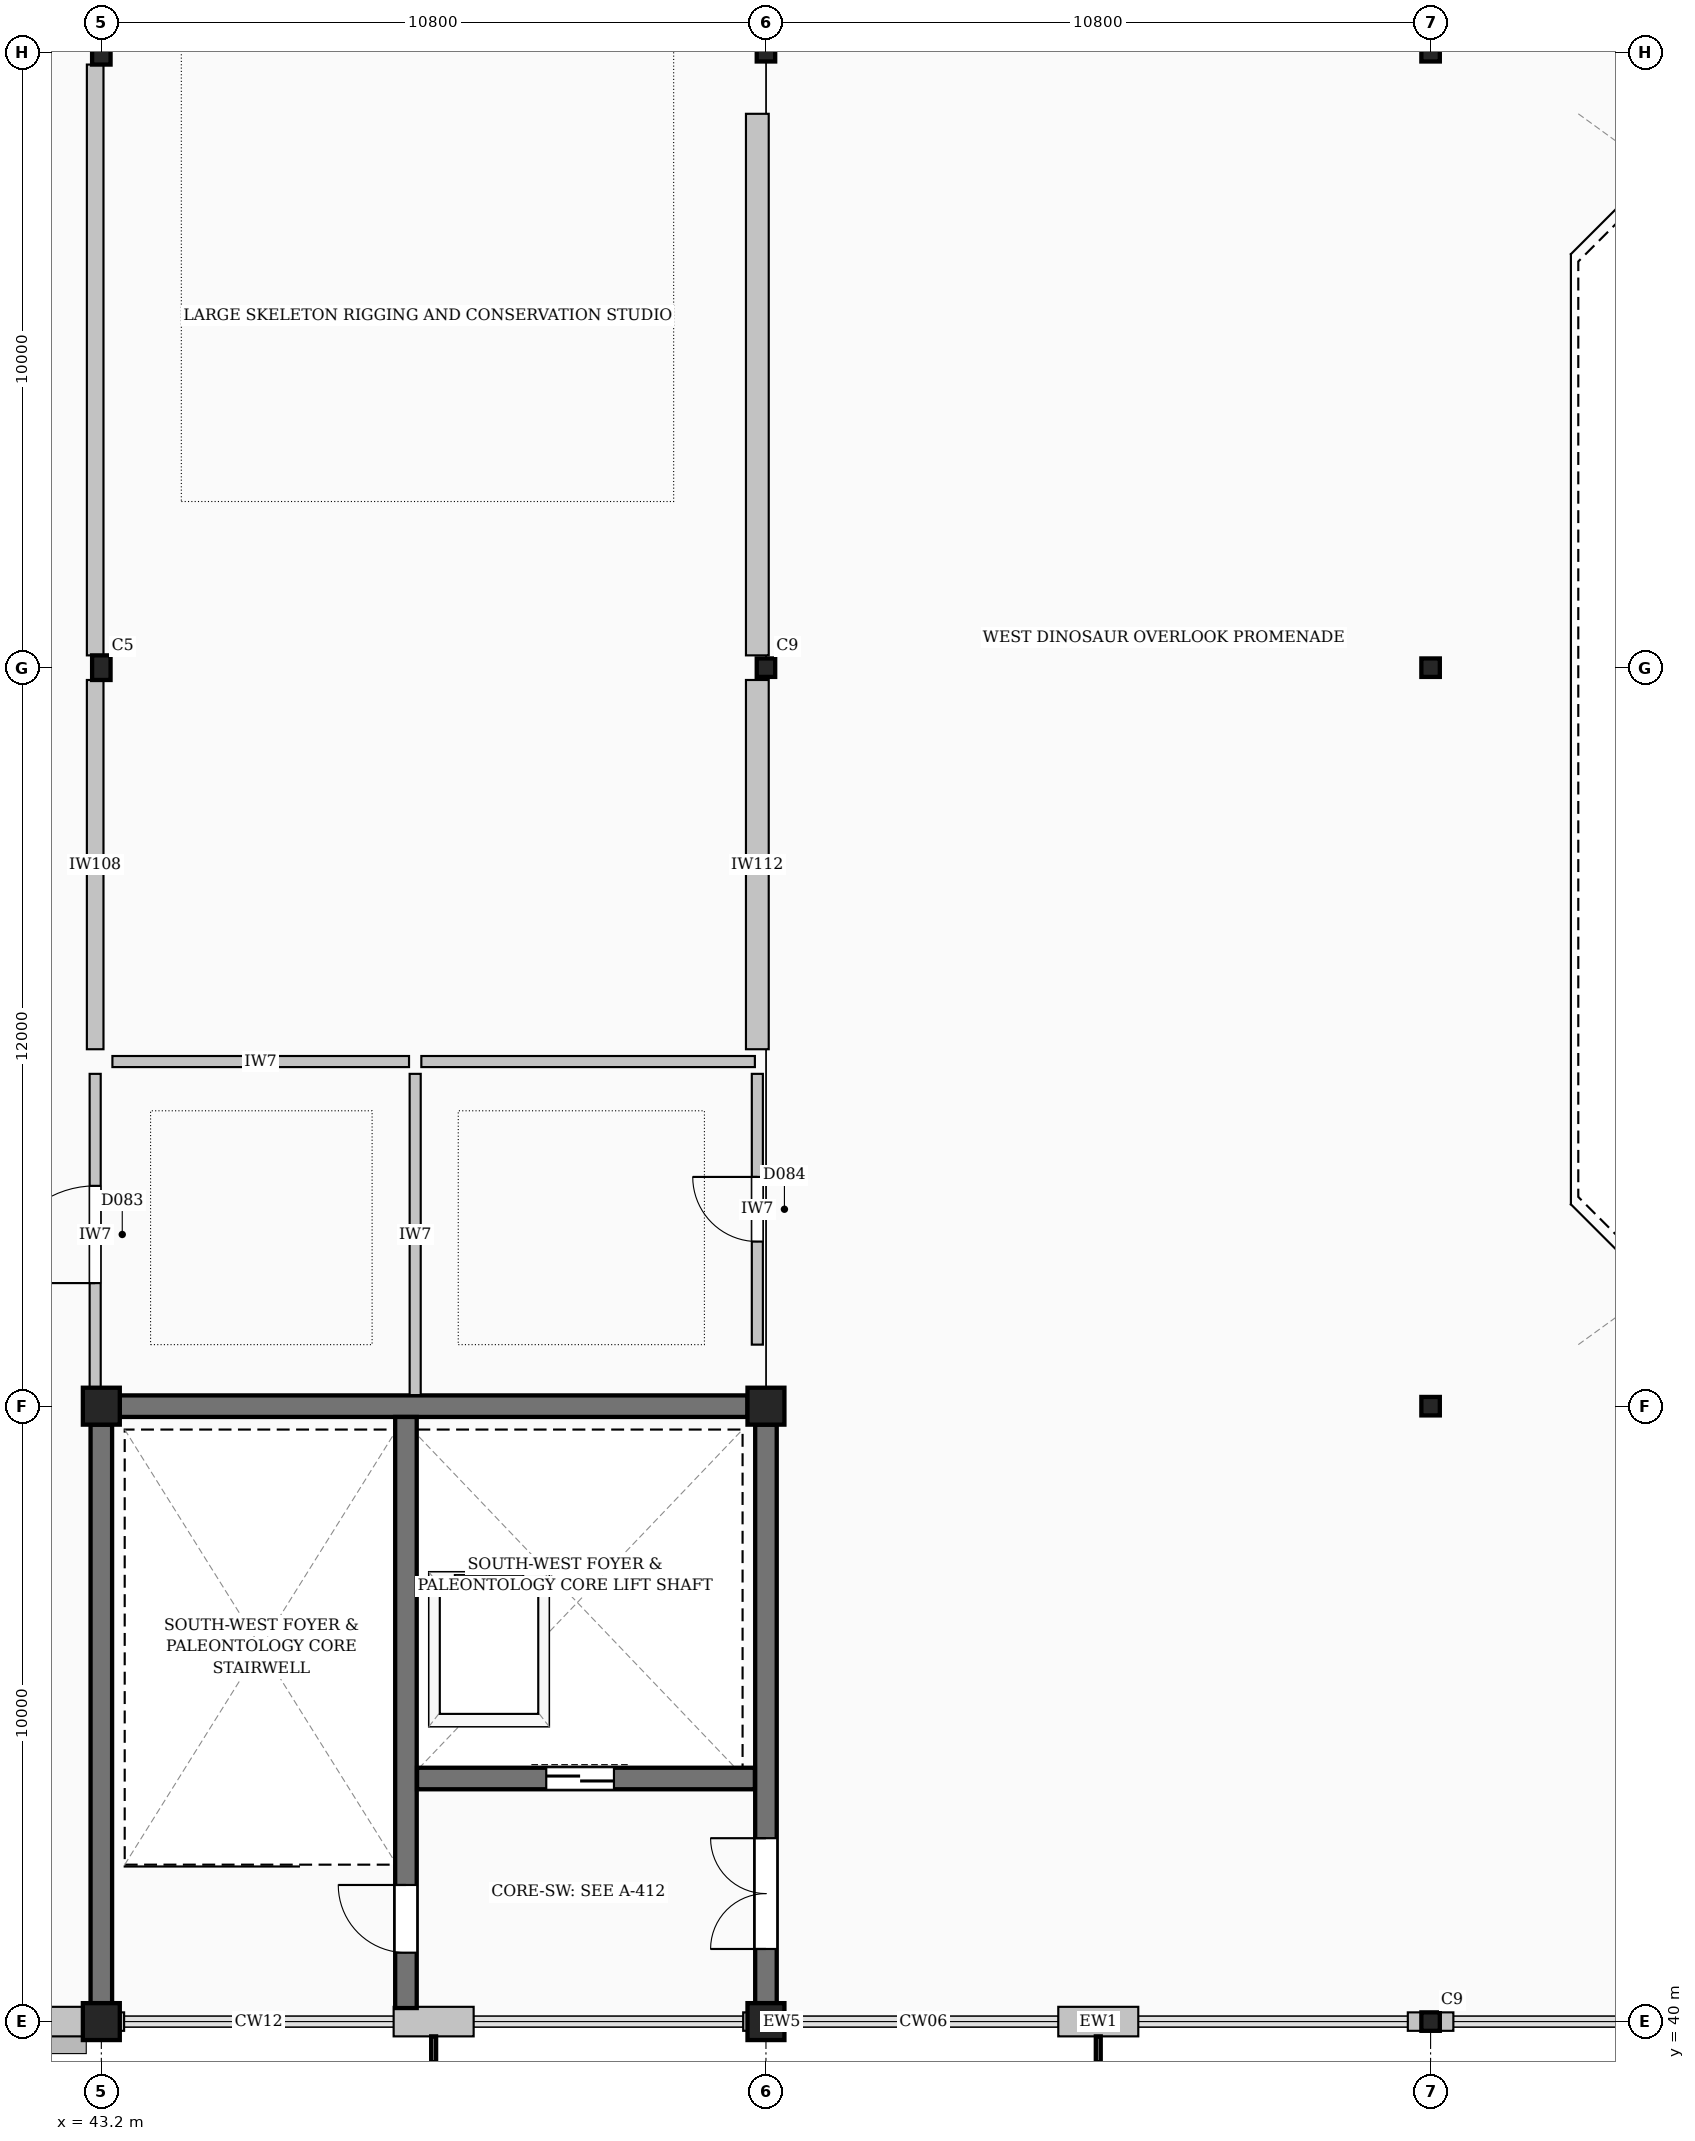
"""IFC4 building model, lengths in metres.
Left out: names, types, materials, properties, quantities, classifications, styles, units other than length and angle.
Written with IfcOpenShell. Run it as: python <this file> out.ifc"""

import sys

from ifc_helpers import new_model, si_unit, direction, frame, frame_2d, origin, origin_2d, place, context, subcontext, project, spatial, rectangle, hollow_rectangle, i_section, extrude, element, fill, save


model = new_model("IFC4")
c1 = context("Model", 3, precision=1e-05, world=origin(), true_north=direction((0.0, 1.0)))
c2 = subcontext(c1, "Body", "Model", "MODEL_VIEW")
j1 = project(units=[si_unit("LENGTHUNIT", "METRE"), si_unit("PLANEANGLEUNIT", "RADIAN")], contexts=[c1])
p1 = place(None, origin())
s1 = spatial("IfcSite", under=j1, at=p1, CompositionType="ELEMENT")
p2 = place(p1, origin())
s2 = spatial("IfcBuilding", under=s1, at=p2, CompositionType="ELEMENT")
p3 = place(p2, frame((0.0, 0.0, 14.4)))
s3 = spatial("IfcBuildingStorey", under=s2, at=p3, CompositionType="ELEMENT", Elevation=14.4)
for number, where, z_axis, x_axis in (
    (1, (43.2, 40.0, 0.0), (0.0, 0.0, 1.0), (1.0, 0.0, 0.0)),
    (2, (43.2, 50.0, 0.0), (0.0, 0.0, 1.0), (1.0, 0.0, 0.0)),
):
    element("IfcColumn", number, at=place(p3, frame(where, z_axis=z_axis, x_axis=x_axis)), inside=s3, PredefinedType="COLUMN", context=c2, shape_type="SweptSolid", body=[
        extrude(rectangle(XDim=0.6, YDim=0.6, at=origin_2d()), origin(), (0.0, 0.0, 1.0), 9.6),
    ])
for number, where, z_axis, x_axis in (
    (3, (43.2, 62.0, 0.0), (0.0, 0.0, 1.0), (1.0, 0.0, 0.0)),
    (4, (43.2, 72.0, 0.0), (0.0, 0.0, 1.0), (1.0, 0.0, 0.0)),
):
    element("IfcColumn", number, at=place(p3, frame(where, z_axis=z_axis, x_axis=x_axis)), inside=s3, PredefinedType="COLUMN", context=c2, shape_type="SweptSolid", body=[
        extrude(i_section(OverallWidth=0.3, OverallDepth=0.4, WebThickness=0.013, FlangeThickness=0.024, FilletRadius=0.027, at=origin_2d()), origin(), (0.0, 0.0, 1.0), 9.6),
    ])
for number, where, z_axis, x_axis in (
    (5, (54.0, 40.0, 0.0), (0.0, 0.0, 1.0), (1.0, 0.0, 0.0)),
    (6, (54.0, 50.0, 0.0), (0.0, 0.0, 1.0), (1.0, 0.0, 0.0)),
):
    element("IfcColumn", number, at=place(p3, frame(where, z_axis=z_axis, x_axis=x_axis)), inside=s3, PredefinedType="COLUMN", context=c2, shape_type="SweptSolid", body=[
        extrude(rectangle(XDim=0.6, YDim=0.6, at=origin_2d()), origin(), (0.0, 0.0, 1.0), 9.6),
    ])
for number, where, z_axis, x_axis in (
    (7, (54.0, 62.0, 0.0), (0.0, 0.0, 1.0), (1.0, 0.0, 0.0)),
    (8, (54.0, 72.0, 0.0), (0.0, 0.0, 1.0), (1.0, 0.0, 0.0)),
    (9, (64.8, 40.0, 0.0), (0.0, 0.0, 1.0), (1.0, 0.0, 0.0)),
    (10, (64.8, 50.0, 0.0), (0.0, 0.0, 1.0), (1.0, 0.0, 0.0)),
    (11, (64.8, 62.0, 0.0), (0.0, 0.0, 1.0), (1.0, 0.0, 0.0)),
    (12, (64.8, 72.0, 0.0), (0.0, 0.0, 1.0), (1.0, 0.0, 0.0)),
):
    element("IfcColumn", number, at=place(p3, frame(where, z_axis=z_axis, x_axis=x_axis)), inside=s3, PredefinedType="COLUMN", context=c2, shape_type="SweptSolid", body=[
        extrude(hollow_rectangle(XDim=0.3, YDim=0.3, WallThickness=0.016, InnerFilletRadius=0.016, OuterFilletRadius=0.032, at=origin_2d()), origin(), (0.0, 0.0, 1.0), 9.6),
    ])
p4 = place(p3, frame((32.545, 40.0, 0.0), z_axis=(0.0, 0.0, 1.0), x_axis=(1.0, 0.0, 0.0)))
e13 = element("IfcWall", 13, at=p4, inside=s3, PredefinedType="STANDARD", context=c2, shape_type="SweptSolid", body=[
    extrude(rectangle(XDim=10.51, YDim=0.48, at=frame_2d((5.255, 0.0))), origin(), (0.0, 0.0, 1.0), 9.36),
])
p5 = place(p4, frame((3.555, 0.0, 1.1)))
e14 = element("IfcOpeningElement", 14, at=p5, cuts=e13, PredefinedType="OPENING", context=c2, shape_type="SweptSolid", body=[
    extrude(rectangle(XDim=3.4, YDim=5.8, at=frame_2d((1.7, 2.9))), frame((0.0, 0.25, 0.0), z_axis=(0.0, -1.0, 0.0), x_axis=(1.0, 0.0, 0.0)), (0.0, 0.0, 1.0), 0.5),
])
p6 = place(p3, frame((47.95, 40.0, 0.0), z_axis=(0.0, 0.0, 1.0), x_axis=(1.0, 0.0, 0.0)))
e15 = element("IfcWall", 15, at=p6, inside=s3, PredefinedType="STANDARD", context=c2, shape_type="SweptSolid", body=[
    extrude(rectangle(XDim=1.3, YDim=0.48, at=frame_2d((0.65, 0.0))), origin(), (0.0, 0.0, 1.0), 9.36),
])
for number, where, z_axis, x_axis in (
    (16, (43.345, 40.0, 0.0), (0.0, 0.0, 1.0), (1.0, 0.0, 0.0)),
    (17, (53.63, 40.0, 0.0), (0.0, 0.0, 1.0), (1.0, 0.0, 0.0)),
):
    element("IfcWall", number, at=place(p3, frame(where, z_axis=z_axis, x_axis=x_axis)), inside=s3, PredefinedType="STANDARD", context=c2, shape_type="SweptSolid", body=[
        extrude(rectangle(XDim=0.225, YDim=0.3, at=frame_2d((0.113, 0.0))), origin(), (0.0, 0.0, 1.0), 9.36),
    ])
p7 = place(p3, frame((58.75, 40.0, 0.0), z_axis=(0.0, 0.0, 1.0), x_axis=(1.0, 0.0, 0.0)))
e18 = element("IfcWall", 18, at=p7, inside=s3, PredefinedType="STANDARD", context=c2, shape_type="SweptSolid", body=[
    extrude(rectangle(XDim=1.3, YDim=0.48, at=frame_2d((0.65, 0.0))), origin(), (0.0, 0.0, 1.0), 8.96),
])
for number, where, z_axis, x_axis in (
    (19, (54.145, 40.0, 0.0), (0.0, 0.0, 1.0), (1.0, 0.0, 0.0)),
    (20, (64.43, 40.0, 0.0), (0.0, 0.0, 1.0), (1.0, 0.0, 0.0)),
):
    element("IfcWall", number, at=place(p3, frame(where, z_axis=z_axis, x_axis=x_axis)), inside=s3, PredefinedType="STANDARD", context=c2, shape_type="SweptSolid", body=[
        extrude(rectangle(XDim=0.225, YDim=0.3, at=frame_2d((0.113, 0.0))), origin(), (0.0, 0.0, 1.0), 9.36),
    ])
p8 = place(p3, frame((64.945, 40.0, 0.0), z_axis=(0.0, 0.0, 1.0), x_axis=(1.0, 0.0, 0.0)))
e21 = element("IfcWall", 21, at=p8, inside=s3, PredefinedType="STANDARD", context=c2, shape_type="SweptSolid", body=[
    extrude(rectangle(XDim=0.225, YDim=0.3, at=frame_2d((0.112, 0.0))), origin(), (0.0, 0.0, 1.0), 9.36),
])
p9 = place(p3, frame((43.5, 50.0, 0.0), z_axis=(0.0, 0.0, 1.0), x_axis=(1.0, 0.0, 0.0)))
e22 = element("IfcWall", 22, at=p9, inside=s3, PredefinedType="SHEAR", context=c2, shape_type="SweptSolid", body=[
    extrude(rectangle(XDim=10.2, YDim=0.35, at=frame_2d((5.1, 0.0))), origin(), (0.0, 0.0, 1.0), 9.36),
])
p10 = place(p3, frame((43.2, 40.3, 0.0), z_axis=(0.0, 0.0, 1.0), x_axis=(0.0, 1.0, 0.0)))
e23 = element("IfcWall", 23, at=p10, inside=s3, PredefinedType="SHEAR", context=c2, shape_type="SweptSolid", body=[
    extrude(rectangle(XDim=9.4, YDim=0.35, at=frame_2d((4.7, 0.0))), origin(), (0.0, 0.0, 1.0), 9.36),
])
p11 = place(p3, frame((54.0, 40.3, 0.0), z_axis=(0.0, 0.0, 1.0), x_axis=(0.0, 1.0, 0.0)))
e24 = element("IfcWall", 24, at=p11, inside=s3, PredefinedType="SHEAR", context=c2, shape_type="SweptSolid", body=[
    extrude(rectangle(XDim=9.4, YDim=0.35, at=frame_2d((4.7, 0.0))), origin(), (0.0, 0.0, 1.0), 9.36),
])
p12 = place(p11, frame((0.88, 0.0, 0.0)))
e25 = element("IfcOpeningElement", 25, at=p12, cuts=e24, PredefinedType="OPENING", context=c2, shape_type="SweptSolid", body=[
    extrude(rectangle(XDim=1.8, YDim=2.25, at=frame_2d((0.9, 1.125))), frame((0.0, 0.185, 0.0), z_axis=(0.0, -1.0, 0.0), x_axis=(1.0, 0.0, 0.0)), (0.0, 0.0, 1.0), 0.37),
])
p13 = place(p3, frame((48.15, 40.22, 0.0), z_axis=(0.0, 0.0, 1.0), x_axis=(0.0, 1.0, 0.0)))
e26 = element("IfcWall", 26, at=p13, inside=s3, PredefinedType="SHEAR", context=c2, shape_type="SweptSolid", body=[
    extrude(rectangle(XDim=9.605, YDim=0.35, at=frame_2d((4.802, 0.0))), origin(), (0.0, 0.0, 1.0), 9.36),
])
p14 = place(p13, frame((0.9, 0.0, 0.0)))
e27 = element("IfcOpeningElement", 27, at=p14, cuts=e26, PredefinedType="OPENING", context=c2, shape_type="SweptSolid", body=[
    extrude(rectangle(XDim=1.1, YDim=2.2, at=frame_2d((0.55, 1.1))), frame((0.0, 0.185, 0.0), z_axis=(0.0, -1.0, 0.0), x_axis=(1.0, 0.0, 0.0)), (0.0, 0.0, 1.0), 0.37),
])
p15 = place(p3, frame((48.33, 43.95, 0.0), z_axis=(0.0, 0.0, 1.0), x_axis=(1.0, 0.0, 0.0)))
e28 = element("IfcWall", 28, at=p15, inside=s3, PredefinedType="SHEAR", context=c2, shape_type="SweptSolid", body=[
    extrude(rectangle(XDim=5.49, YDim=0.35, at=frame_2d((2.745, 0.0))), origin(), (0.0, 0.0, 1.0), 9.36),
])
p16 = place(p15, frame((2.1, 0.0, 0.0)))
e29 = element("IfcOpeningElement", 29, at=p16, cuts=e28, PredefinedType="OPENING", context=c2, shape_type="SweptSolid", body=[
    extrude(rectangle(XDim=1.1, YDim=2.2, at=frame_2d((0.55, 1.1))), frame((0.0, 0.185, 0.0), z_axis=(0.0, -1.0, 0.0), x_axis=(1.0, 0.0, 0.0)), (0.0, 0.0, 1.0), 0.37),
])
p17 = place(p3, frame((43.1, 50.18, 0.0), z_axis=(0.0, 0.0, 1.0), x_axis=(0.0, 1.0, 0.0)))
e30 = element("IfcWall", 30, at=p17, inside=s3, PredefinedType="PLUMBINGWALL", context=c2, shape_type="SweptSolid", body=[
    extrude(rectangle(XDim=5.22, YDim=0.18, at=frame_2d((2.61, 0.0))), origin(), (0.0, 0.0, 1.0), 9.32),
])
p18 = place(p17, frame((1.82, 0.0, 0.0)))
e31 = element("IfcOpeningElement", 31, at=p18, cuts=e30, PredefinedType="OPENING", context=c2, shape_type="SweptSolid", body=[
    extrude(rectangle(XDim=1.58, YDim=2.48, at=frame_2d((0.79, 1.24))), frame((0.0, 0.1, 0.0), z_axis=(0.0, -1.0, 0.0), x_axis=(1.0, 0.0, 0.0)), (0.0, 0.0, 1.0), 0.2),
])
p19 = place(p3, frame((53.86, 51.0, 0.0), z_axis=(0.0, 0.0, 1.0), x_axis=(0.0, 1.0, 0.0)))
e32 = element("IfcWall", 32, at=p19, inside=s3, PredefinedType="PLUMBINGWALL", context=c2, shape_type="SweptSolid", body=[
    extrude(rectangle(XDim=4.4, YDim=0.18, at=frame_2d((2.2, 0.0))), origin(), (0.0, 0.0, 1.0), 9.32),
])
p20 = place(p19, frame((1.675, 0.0, 0.0)))
e33 = element("IfcOpeningElement", 33, at=p20, cuts=e32, PredefinedType="OPENING", context=c2, shape_type="SweptSolid", body=[
    extrude(rectangle(XDim=1.05, YDim=2.15, at=frame_2d((0.525, 1.075))), frame((0.0, 0.1, 0.0), z_axis=(0.0, -1.0, 0.0), x_axis=(1.0, 0.0, 0.0)), (0.0, 0.0, 1.0), 0.2),
])
p21 = place(p3, frame((43.38, 55.6, 0.0), z_axis=(0.0, 0.0, 1.0), x_axis=(1.0, 0.0, 0.0)))
e34 = element("IfcWall", 34, at=p21, inside=s3, PredefinedType="PLUMBINGWALL", context=c2, shape_type="SweptSolid", body=[
    extrude(rectangle(XDim=4.82, YDim=0.18, at=frame_2d((2.41, 0.0))), origin(), (0.0, 0.0, 1.0), 9.32),
])
p22 = place(p3, frame((48.4, 55.6, 0.0), z_axis=(0.0, 0.0, 1.0), x_axis=(1.0, 0.0, 0.0)))
e35 = element("IfcWall", 35, at=p22, inside=s3, PredefinedType="PLUMBINGWALL", context=c2, shape_type="SweptSolid", body=[
    extrude(rectangle(XDim=5.42, YDim=0.18, at=frame_2d((2.71, 0.0))), origin(), (0.0, 0.0, 1.0), 9.32),
])
p23 = place(p3, frame((43.1, 55.8, 0.0), z_axis=(0.0, 0.0, 1.0), x_axis=(0.0, 1.0, 0.0)))
e36 = element("IfcWall", 36, at=p23, inside=s3, PredefinedType="PARTITIONING", context=c2, shape_type="SweptSolid", body=[
    extrude(rectangle(XDim=6.0, YDim=0.27, at=frame_2d((3.0, 0.0))), origin(), (0.0, 0.0, 1.0), 9.32),
])
p24 = place(p3, frame((43.1, 62.2, 0.0), z_axis=(0.0, 0.0, 1.0), x_axis=(0.0, 1.0, 0.0)))
e37 = element("IfcWall", 37, at=p24, inside=s3, PredefinedType="PARTITIONING", context=c2, shape_type="SweptSolid", body=[
    extrude(rectangle(XDim=9.6, YDim=0.27, at=frame_2d((4.8, 0.0))), origin(), (0.0, 0.0, 1.0), 9.32),
])
p25 = place(p3, frame((48.3, 50.18, 0.0), z_axis=(0.0, 0.0, 1.0), x_axis=(0.0, 1.0, 0.0)))
e38 = element("IfcWall", 38, at=p25, inside=s3, PredefinedType="PLUMBINGWALL", context=c2, shape_type="SweptSolid", body=[
    extrude(rectangle(XDim=5.22, YDim=0.18, at=frame_2d((2.61, 0.0))), origin(), (0.0, 0.0, 1.0), 9.32),
])
p26 = place(p3, frame((53.86, 55.8, 0.0), z_axis=(0.0, 0.0, 1.0), x_axis=(0.0, 1.0, 0.0)))
e39 = element("IfcWall", 39, at=p26, inside=s3, PredefinedType="PARTITIONING", context=c2, shape_type="SweptSolid", body=[
    extrude(rectangle(XDim=6.0, YDim=0.37, at=frame_2d((3.0, 0.0))), origin(), (0.0, 0.0, 1.0), 9.32),
])
p27 = place(p3, frame((53.86, 62.2, 0.0), z_axis=(0.0, 0.0, 1.0), x_axis=(0.0, 1.0, 0.0)))
e40 = element("IfcWall", 40, at=p27, inside=s3, PredefinedType="PARTITIONING", context=c2, shape_type="SweptSolid", body=[
    extrude(rectangle(XDim=8.8, YDim=0.37, at=frame_2d((4.4, 0.0))), origin(), (0.0, 0.0, 1.0), 9.32),
])
p28 = place(p14, origin())
e41 = element("IfcDoor", 41, at=p28, inside=s3, OperationType="SINGLE_SWING_RIGHT", PredefinedType="DOOR", context=c2, shape_type="SweptSolid", body=[
    extrude(rectangle(XDim=1.1, YDim=2.2, at=frame_2d((0.55, 1.1))), frame((0.0, 0.025, 0.0), z_axis=(0.0, -1.0, 0.0), x_axis=(1.0, 0.0, 0.0)), (0.0, 0.0, 1.0), 0.05),
])
fill(e27, e41)
p29 = place(p12, origin())
e42 = element("IfcDoor", 42, at=p29, inside=s3, OperationType="DOUBLE_DOOR_SINGLE_SWING", PredefinedType="DOOR", context=c2, shape_type="SweptSolid", body=[
    extrude(rectangle(XDim=1.8, YDim=2.25, at=frame_2d((0.9, 1.125))), frame((0.0, 0.025, 0.0), z_axis=(0.0, -1.0, 0.0), x_axis=(1.0, 0.0, 0.0)), (0.0, 0.0, 1.0), 0.05),
])
fill(e25, e42)
p30 = place(p16, origin())
e43 = element("IfcDoor", 43, at=p30, inside=s3, OperationType="DOUBLE_DOOR_SLIDING", PredefinedType="DOOR", context=c2, shape_type="SweptSolid", body=[
    extrude(rectangle(XDim=1.1, YDim=2.2, at=frame_2d((0.55, 1.1))), frame((0.0, 0.025, 0.0), z_axis=(0.0, -1.0, 0.0), x_axis=(1.0, 0.0, 0.0)), (0.0, 0.0, 1.0), 0.05),
])
fill(e29, e43)
p31 = place(p18, origin())
e44 = element("IfcDoor", 44, at=p31, inside=s3, OperationType="SINGLE_SWING_LEFT", PredefinedType="DOOR", context=c2, shape_type="SweptSolid", body=[
    extrude(rectangle(XDim=1.58, YDim=2.48, at=frame_2d((0.79, 1.24))), frame((0.0, 0.025, 0.0), z_axis=(0.0, -1.0, 0.0), x_axis=(1.0, 0.0, 0.0)), (0.0, 0.0, 1.0), 0.05),
])
fill(e31, e44)
p32 = place(p20, origin())
e45 = element("IfcDoor", 45, at=p32, inside=s3, OperationType="SINGLE_SWING_RIGHT", PredefinedType="DOOR", context=c2, shape_type="SweptSolid", body=[
    extrude(rectangle(XDim=1.05, YDim=2.15, at=frame_2d((0.525, 1.075))), frame((0.0, 0.025, 0.0), z_axis=(0.0, -1.0, 0.0), x_axis=(1.0, 0.0, 0.0)), (0.0, 0.0, 1.0), 0.05),
])
fill(e33, e45)
save(model, sys.argv[1])
